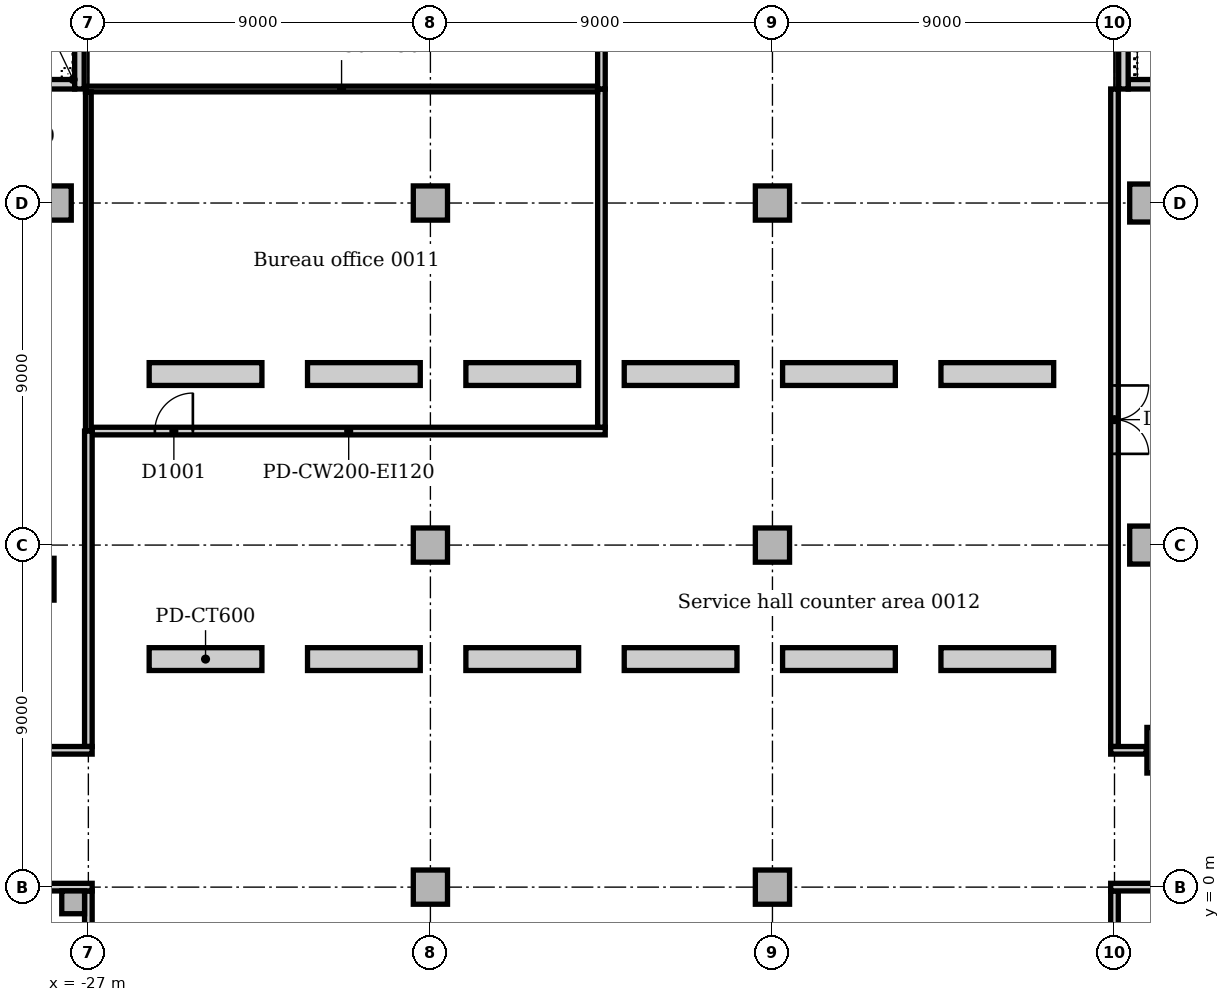
"""IFC4 building model, lengths in metres.
Left out: names, types, materials, properties, quantities, classifications, styles, units other than length and angle.
Written with IfcOpenShell. Run it as: python <this file> out.ifc"""

import sys

from ifc_helpers import new_model, si_unit, direction, frame, frame_2d, origin, origin_2d, place, context, subcontext, project, spatial, rectangle, extrude, element, fill, save


model = new_model("IFC4")
c1 = context("Model", 3, precision=1e-05, world=origin(), true_north=direction((0.0, 1.0)))
c2 = subcontext(c1, "Body", "Model", "MODEL_VIEW")
j1 = project(units=[si_unit("LENGTHUNIT", "METRE"), si_unit("PLANEANGLEUNIT", "RADIAN")], contexts=[c1])
p1 = place(None, origin())
s1 = spatial("IfcSite", under=j1, at=p1, CompositionType="ELEMENT")
p2 = place(p1, origin())
s2 = spatial("IfcBuilding", under=s1, at=p2, CompositionType="ELEMENT")
p3 = place(p2, origin())
s3 = spatial("IfcBuildingStorey", under=s2, at=p3, CompositionType="ELEMENT", Elevation=0.0)
p4 = place(p3, frame((0.36, 21.125, 0.0), z_axis=(0.0, 0.0, 1.0), x_axis=(1.0, 0.0, 0.0)))
e1 = element("IfcWall", 1, at=p4, inside=s3, PredefinedType="SOLIDWALL", context=c2, shape_type="SweptSolid", body=[
    extrude(rectangle(XDim=3.54, YDim=0.25, at=frame_2d((1.77, 0.0))), origin(), (0.0, 0.0, 1.0), 6.0),
])
p5 = place(p3, frame((0.235, 21.0, 0.0), z_axis=(0.0, 0.0, 1.0), x_axis=(0.0, 1.0, 0.0)))
e2 = element("IfcWall", 2, at=p5, inside=s3, PredefinedType="SOLIDWALL", context=c2, shape_type="SweptSolid", body=[
    extrude(rectangle(XDim=21.0, YDim=0.25, at=frame_2d((10.5, 0.0))), origin(), (0.0, 0.0, 1.0), 6.0),
])
p6 = place(p5, frame((10.0, 0.0, 0.0)))
e3 = element("IfcOpeningElement", 3, at=p6, cuts=e2, PredefinedType="OPENING", context=c2, shape_type="SweptSolid", body=[
    extrude(rectangle(XDim=1.0, YDim=2.1, at=frame_2d((0.5, 1.05))), frame((0.0, 0.135, 0.0), z_axis=(0.0, -1.0, 0.0), x_axis=(1.0, 0.0, 0.0)), (0.0, 0.0, 1.0), 0.27),
])
p7 = place(p3, frame((1.453, 3.602, 0.0), z_axis=(0.0, 0.0, 1.0), x_axis=(1.0, 0.0, 0.0)))
e4 = element("IfcColumn", 4, at=p7, inside=s3, PredefinedType="COLUMN", context=c2, shape_type="SweptSolid", body=[
    extrude(rectangle(XDim=1.2, YDim=1.2, at=origin_2d()), origin(), (0.0, 0.0, 1.0), 5.7),
])
for number, where, z_axis, x_axis in (
    (5, (0.9, 9.0, 0.0), (0.0, 0.0, 1.0), (1.0, 0.0, 0.0)),
    (6, (0.9, 18.0, 0.0), (0.0, 0.0, 1.0), (1.0, 0.0, 0.0)),
):
    element("IfcColumn", number, at=place(p3, frame(where, z_axis=z_axis, x_axis=x_axis)), inside=s3, PredefinedType="COLUMN", context=c2, shape_type="SweptSolid", body=[
        extrude(rectangle(XDim=1.0, YDim=1.0, at=origin_2d()), origin(), (0.0, 0.0, 1.0), 5.7),
    ])
p8 = place(p3, frame((-30.9, 21.125, 0.0), z_axis=(0.0, 0.0, 1.0), x_axis=(1.0, 0.0, 0.0)))
e7 = element("IfcWall", 7, at=p8, inside=s3, PredefinedType="SOLIDWALL", context=c2, shape_type="SweptSolid", body=[
    extrude(rectangle(XDim=3.54, YDim=0.25, at=frame_2d((1.77, 0.0))), origin(), (0.0, 0.0, 1.0), 6.0),
])
p9 = place(p3, frame((-27.235, 21.0, 0.0), z_axis=(0.0, 0.0, 1.0), x_axis=(0.0, 1.0, 0.0)))
e8 = element("IfcWall", 8, at=p9, inside=s3, PredefinedType="SOLIDWALL", context=c2, shape_type="SweptSolid", body=[
    extrude(rectangle(XDim=6.65, YDim=0.25, at=frame_2d((3.325, 0.0))), origin(), (0.0, 0.0, 1.0), 6.0),
])
p10 = place(p3, frame((-28.453, 8.102, 0.0), z_axis=(0.0, 0.0, 1.0), x_axis=(1.0, 0.0, 0.0)))
e9 = element("IfcColumn", 9, at=p10, inside=s3, PredefinedType="COLUMN", context=c2, shape_type="SweptSolid", body=[
    extrude(rectangle(XDim=1.1, YDim=1.1, at=origin_2d()), origin(), (0.0, 0.0, 1.0), 5.7),
])
for number, where, z_axis, x_axis in (
    (10, (-27.9, 18.0, 0.0), (0.0, 0.0, 1.0), (1.0, 0.0, 0.0)),
    (11, (-18.0, 0.0, 0.0), (0.0, 0.0, 1.0), (1.0, 0.0, 0.0)),
    (12, (-18.0, 9.0, 0.0), (0.0, 0.0, 1.0), (1.0, 0.0, 0.0)),
    (13, (-18.0, 18.0, 0.0), (0.0, 0.0, 1.0), (1.0, 0.0, 0.0)),
    (14, (-9.0, 0.0, 0.0), (0.0, 0.0, 1.0), (1.0, 0.0, 0.0)),
    (15, (-9.0, 9.0, 0.0), (0.0, 0.0, 1.0), (1.0, 0.0, 0.0)),
    (16, (-9.0, 18.0, 0.0), (0.0, 0.0, 1.0), (1.0, 0.0, 0.0)),
):
    element("IfcColumn", number, at=place(p3, frame(where, z_axis=z_axis, x_axis=x_axis)), inside=s3, PredefinedType="COLUMN", context=c2, shape_type="SweptSolid", body=[
        extrude(rectangle(XDim=0.9, YDim=0.9, at=origin_2d()), origin(), (0.0, 0.0, 1.0), 5.7),
    ])
p11 = place(p3, frame((-27.4, -0.4, 0.0), z_axis=(0.0, 0.0, 1.0), x_axis=(1.0, 0.0, 0.0)))
e17 = element("IfcColumn", 17, at=p11, inside=s3, PredefinedType="COLUMN", context=c2, shape_type="SweptSolid", body=[
    extrude(rectangle(XDim=0.6, YDim=0.6, at=origin_2d()), origin(), (0.0, 0.0, 1.0), 6.0),
])
p12 = place(p3, frame((-27.0, -8.53, 0.0), z_axis=(0.0, 0.0, 1.0), x_axis=(0.0, 1.0, 0.0)))
e18 = element("IfcWall", 18, at=p12, inside=s3, PredefinedType="SOLIDWALL", context=c2, shape_type="SweptSolid", body=[
    extrude(rectangle(XDim=8.43, YDim=0.2, at=frame_2d((4.215, 0.0))), origin(), (0.0, 0.0, 1.0), 5.7),
])
p13 = place(p3, frame((-36.0, 0.0, 0.0), z_axis=(0.0, 0.0, 1.0), x_axis=(1.0, 0.0, 0.0)))
e19 = element("IfcWall", 19, at=p13, inside=s3, PredefinedType="SOLIDWALL", context=c2, shape_type="SweptSolid", body=[
    extrude(rectangle(XDim=9.1, YDim=0.2, at=frame_2d((4.55, 0.0))), origin(), (0.0, 0.0, 1.0), 5.7),
])
p14 = place(p3, frame((0.0, -8.53, 0.0), z_axis=(0.0, 0.0, 1.0), x_axis=(0.0, 1.0, 0.0)))
e20 = element("IfcWall", 20, at=p14, inside=s3, PredefinedType="PARTITIONING", context=c2, shape_type="SweptSolid", body=[
    extrude(rectangle(XDim=8.43, YDim=0.2, at=frame_2d((4.215, 0.0))), origin(), (0.0, 0.0, 1.0), 5.7),
])
p15 = place(p14, frame((2.03, 0.0, 0.0)))
e21 = element("IfcOpeningElement", 21, at=p15, cuts=e20, PredefinedType="OPENING", context=c2, shape_type="SweptSolid", body=[
    extrude(rectangle(XDim=1.0, YDim=2.1, at=frame_2d((0.5, 1.05))), frame((0.0, 0.11, 0.0), z_axis=(0.0, -1.0, 0.0), x_axis=(1.0, 0.0, 0.0)), (0.0, 0.0, 1.0), 0.22),
])
p16 = place(p3, frame((-26.9, 12.0, 0.0), z_axis=(0.0, 0.0, 1.0), x_axis=(1.0, 0.0, 0.0)))
e22 = element("IfcWall", 22, at=p16, inside=s3, PredefinedType="PARTITIONING", context=c2, shape_type="SweptSolid", body=[
    extrude(rectangle(XDim=13.5, YDim=0.2, at=frame_2d((6.75, 0.0))), origin(), (0.0, 0.0, 1.0), 5.7),
])
p17 = place(p16, frame((1.65, 0.0, 0.0)))
e23 = element("IfcOpeningElement", 23, at=p17, cuts=e22, PredefinedType="OPENING", context=c2, shape_type="SweptSolid", body=[
    extrude(rectangle(XDim=1.0, YDim=2.1, at=frame_2d((0.5, 1.05))), frame((0.0, 0.11, 0.0), z_axis=(0.0, -1.0, 0.0), x_axis=(1.0, 0.0, 0.0)), (0.0, 0.0, 1.0), 0.22),
])
p18 = place(p3, frame((-13.5, 12.1, 0.0), z_axis=(0.0, 0.0, 1.0), x_axis=(0.0, 1.0, 0.0)))
e24 = element("IfcWall", 24, at=p18, inside=s3, PredefinedType="PARTITIONING", context=c2, shape_type="SweptSolid", body=[
    extrude(rectangle(XDim=8.9, YDim=0.2, at=frame_2d((4.45, 0.0))), origin(), (0.0, 0.0, 1.0), 5.7),
])
p19 = place(p3, frame((-27.075, 21.0, 0.0), z_axis=(0.0, 0.0, 1.0), x_axis=(1.0, 0.0, 0.0)))
e25 = element("IfcWall", 25, at=p19, inside=s3, PredefinedType="PARTITIONING", context=c2, shape_type="SweptSolid", body=[
    extrude(rectangle(XDim=13.475, YDim=0.15, at=frame_2d((6.737, 0.0))), origin(), (0.0, 0.0, 1.0), 5.7),
])
p20 = place(p3, frame((-27.0, 12.0, 0.0), z_axis=(0.0, 0.0, 1.0), x_axis=(0.0, 1.0, 0.0)))
e26 = element("IfcWall", 26, at=p20, inside=s3, PredefinedType="PARTITIONING", context=c2, shape_type="SweptSolid", body=[
    extrude(rectangle(XDim=8.925, YDim=0.15, at=frame_2d((4.463, 0.0))), origin(), (0.0, 0.0, 1.0), 5.7),
])
p21 = place(p3, frame((-27.0, 3.7, 0.0), z_axis=(0.0, 0.0, 1.0), x_axis=(0.0, 1.0, 0.0)))
e27 = element("IfcWall", 27, at=p21, inside=s3, PredefinedType="PARTITIONING", context=c2, shape_type="SweptSolid", body=[
    extrude(rectangle(XDim=8.3, YDim=0.2, at=frame_2d((4.15, 0.0))), origin(), (0.0, 0.0, 1.0), 5.7),
])
p22 = place(p3, frame((0.0, 3.7, 0.0), z_axis=(0.0, 0.0, 1.0), x_axis=(0.0, 1.0, 0.0)))
e28 = element("IfcWall", 28, at=p22, inside=s3, PredefinedType="PARTITIONING", context=c2, shape_type="SweptSolid", body=[
    extrude(rectangle(XDim=17.3, YDim=0.2, at=frame_2d((8.65, 0.0))), origin(), (0.0, 0.0, 1.0), 5.7),
])
p23 = place(p22, frame((7.7, 0.0, 0.0)))
e29 = element("IfcOpeningElement", 29, at=p23, cuts=e28, PredefinedType="OPENING", context=c2, shape_type="SweptSolid", body=[
    extrude(rectangle(XDim=1.8, YDim=2.1, at=frame_2d((0.9, 1.05))), frame((0.0, 0.11, 0.0), z_axis=(0.0, -1.0, 0.0), x_axis=(1.0, 0.0, 0.0)), (0.0, 0.0, 1.0), 0.22),
])
p24 = place(p3, frame((-13.5, 21.0, 0.0), z_axis=(0.0, 0.0, 1.0), x_axis=(0.0, 1.0, 0.0)))
e30 = element("IfcWall", 30, at=p24, inside=s3, PredefinedType="PARTITIONING", context=c2, shape_type="SweptSolid", body=[
    extrude(rectangle(XDim=10.0, YDim=0.2, at=frame_2d((5.0, 0.0))), origin(), (0.0, 0.0, 1.0), 5.7),
])
p25 = place(p24, frame((5.5, 0.0, 0.0)))
e31 = element("IfcOpeningElement", 31, at=p25, cuts=e30, PredefinedType="OPENING", context=c2, shape_type="SweptSolid", body=[
    extrude(rectangle(XDim=1.0, YDim=2.1, at=frame_2d((0.5, 1.05))), frame((0.0, 0.11, 0.0), z_axis=(0.0, -1.0, 0.0), x_axis=(1.0, 0.0, 0.0)), (0.0, 0.0, 1.0), 0.22),
])
p26 = place(p3, frame((-36.0, 3.6, 0.0), z_axis=(0.0, 0.0, 1.0), x_axis=(1.0, 0.0, 0.0)))
e32 = element("IfcWall", 32, at=p26, inside=s3, PredefinedType="PARTITIONING", context=c2, shape_type="SweptSolid", body=[
    extrude(rectangle(XDim=9.1, YDim=0.2, at=frame_2d((4.55, 0.0))), origin(), (0.0, 0.0, 1.0), 5.7),
])
p27 = place(p26, frame((4.0, 0.0, 0.0)))
e33 = element("IfcOpeningElement", 33, at=p27, cuts=e32, PredefinedType="OPENING", context=c2, shape_type="SweptSolid", body=[
    extrude(rectangle(XDim=1.0, YDim=2.1, at=frame_2d((0.5, 1.05))), frame((0.0, 0.11, 0.0), z_axis=(0.0, -1.0, 0.0), x_axis=(1.0, 0.0, 0.0)), (0.0, 0.0, 1.0), 0.22),
])
p28 = place(p3, frame((-0.1, 0.0, 0.0), z_axis=(0.0, 0.0, 1.0), x_axis=(1.0, 0.0, 0.0)))
e34 = element("IfcWall", 34, at=p28, inside=s3, PredefinedType="PARTITIONING", context=c2, shape_type="SweptSolid", body=[
    extrude(rectangle(XDim=9.1, YDim=0.2, at=frame_2d((4.55, 0.0))), origin(), (0.0, 0.0, 1.0), 5.7),
])
p29 = place(p3, frame((-0.1, 3.6, 0.0), z_axis=(0.0, 0.0, 1.0), x_axis=(1.0, 0.0, 0.0)))
e35 = element("IfcWall", 35, at=p29, inside=s3, PredefinedType="PARTITIONING", context=c2, shape_type="SweptSolid", body=[
    extrude(rectangle(XDim=0.933, YDim=0.2, at=frame_2d((0.467, 0.0))), origin(), (0.0, 0.0, 1.0), 5.7),
])
p30 = place(p3, frame((-25.4, 6.0, 0.0), z_axis=(0.0, 0.0, 1.0), x_axis=(1.0, 0.0, 0.0)))
e36 = element("IfcWall", 36, at=p30, inside=s3, PredefinedType="MOVABLE", context=c2, shape_type="SweptSolid", body=[
    extrude(rectangle(XDim=2.967, YDim=0.6, at=frame_2d((1.483, 0.0))), origin(), (0.0, 0.0, 1.0), 1.1),
])
p31 = place(p3, frame((-21.233, 6.0, 0.0), z_axis=(0.0, 0.0, 1.0), x_axis=(1.0, 0.0, 0.0)))
e37 = element("IfcWall", 37, at=p31, inside=s3, PredefinedType="MOVABLE", context=c2, shape_type="SweptSolid", body=[
    extrude(rectangle(XDim=2.967, YDim=0.6, at=frame_2d((1.483, 0.0))), origin(), (0.0, 0.0, 1.0), 1.1),
])
for number, where, z_axis, x_axis in (
    (38, (-17.067, 6.0, 0.0), (0.0, 0.0, 1.0), (1.0, 0.0, 0.0)),
    (39, (-12.9, 6.0, 0.0), (0.0, 0.0, 1.0), (1.0, 0.0, 0.0)),
):
    element("IfcWall", number, at=place(p3, frame(where, z_axis=z_axis, x_axis=x_axis)), inside=s3, PredefinedType="MOVABLE", context=c2, shape_type="SweptSolid", body=[
        extrude(rectangle(XDim=2.967, YDim=0.6, at=frame_2d((1.483, 0.0))), origin(), (0.0, 0.0, 1.0), 1.1),
    ])
p32 = place(p3, frame((-8.733, 6.0, 0.0), z_axis=(0.0, 0.0, 1.0), x_axis=(1.0, 0.0, 0.0)))
e40 = element("IfcWall", 40, at=p32, inside=s3, PredefinedType="MOVABLE", context=c2, shape_type="SweptSolid", body=[
    extrude(rectangle(XDim=2.967, YDim=0.6, at=frame_2d((1.483, 0.0))), origin(), (0.0, 0.0, 1.0), 1.1),
])
for number, where, z_axis, x_axis in (
    (41, (-4.567, 6.0, 0.0), (0.0, 0.0, 1.0), (1.0, 0.0, 0.0)),
    (42, (-25.4, 13.5, 0.0), (0.0, 0.0, 1.0), (1.0, 0.0, 0.0)),
):
    element("IfcWall", number, at=place(p3, frame(where, z_axis=z_axis, x_axis=x_axis)), inside=s3, PredefinedType="MOVABLE", context=c2, shape_type="SweptSolid", body=[
        extrude(rectangle(XDim=2.967, YDim=0.6, at=frame_2d((1.483, 0.0))), origin(), (0.0, 0.0, 1.0), 1.1),
    ])
p33 = place(p3, frame((-21.233, 13.5, 0.0), z_axis=(0.0, 0.0, 1.0), x_axis=(1.0, 0.0, 0.0)))
e43 = element("IfcWall", 43, at=p33, inside=s3, PredefinedType="MOVABLE", context=c2, shape_type="SweptSolid", body=[
    extrude(rectangle(XDim=2.967, YDim=0.6, at=frame_2d((1.483, 0.0))), origin(), (0.0, 0.0, 1.0), 1.1),
])
for number, where, z_axis, x_axis in (
    (44, (-17.067, 13.5, 0.0), (0.0, 0.0, 1.0), (1.0, 0.0, 0.0)),
    (45, (-12.9, 13.5, 0.0), (0.0, 0.0, 1.0), (1.0, 0.0, 0.0)),
):
    element("IfcWall", number, at=place(p3, frame(where, z_axis=z_axis, x_axis=x_axis)), inside=s3, PredefinedType="MOVABLE", context=c2, shape_type="SweptSolid", body=[
        extrude(rectangle(XDim=2.967, YDim=0.6, at=frame_2d((1.483, 0.0))), origin(), (0.0, 0.0, 1.0), 1.1),
    ])
p34 = place(p3, frame((-8.733, 13.5, 0.0), z_axis=(0.0, 0.0, 1.0), x_axis=(1.0, 0.0, 0.0)))
e46 = element("IfcWall", 46, at=p34, inside=s3, PredefinedType="MOVABLE", context=c2, shape_type="SweptSolid", body=[
    extrude(rectangle(XDim=2.967, YDim=0.6, at=frame_2d((1.483, 0.0))), origin(), (0.0, 0.0, 1.0), 1.1),
])
p35 = place(p3, frame((-4.567, 13.5, 0.0), z_axis=(0.0, 0.0, 1.0), x_axis=(1.0, 0.0, 0.0)))
e47 = element("IfcWall", 47, at=p35, inside=s3, PredefinedType="MOVABLE", context=c2, shape_type="SweptSolid", body=[
    extrude(rectangle(XDim=2.967, YDim=0.6, at=frame_2d((1.483, 0.0))), origin(), (0.0, 0.0, 1.0), 1.1),
])
p36 = place(p3, frame((0.48, 21.25, 0.0), z_axis=(0.0, 0.0, 1.0), x_axis=(0.0, 1.0, 0.0)))
e48 = element("IfcWall", 48, at=p36, inside=s3, PredefinedType="STANDARD", context=c2, shape_type="SweptSolid", body=[
    extrude(rectangle(XDim=1.955, YDim=0.24, at=frame_2d((0.978, 0.0))), origin(), (0.0, 0.0, 1.0), 6.0),
])
p37 = place(p17, origin())
e49 = element("IfcDoor", 49, at=p37, inside=s3, OperationType="SINGLE_SWING_RIGHT", PredefinedType="DOOR", context=c2, shape_type="SweptSolid", body=[
    extrude(rectangle(XDim=1.0, YDim=2.1, at=frame_2d((0.5, 1.05))), frame((0.0, 0.025, 0.0), z_axis=(0.0, -1.0, 0.0), x_axis=(1.0, 0.0, 0.0)), (0.0, 0.0, 1.0), 0.05),
])
fill(e23, e49)
p38 = place(p23, frame((1.8, 0.0, 0.0), z_axis=(0.0, 0.0, 1.0), x_axis=(-1.0, 0.0, 0.0)))
e50 = element("IfcDoor", 50, at=p38, inside=s3, OperationType="DOUBLE_DOOR_SINGLE_SWING", PredefinedType="DOOR", context=c2, shape_type="SweptSolid", body=[
    extrude(rectangle(XDim=1.8, YDim=2.1, at=frame_2d((0.9, 1.05))), frame((0.0, 0.025, 0.0), z_axis=(0.0, -1.0, 0.0), x_axis=(1.0, 0.0, 0.0)), (0.0, 0.0, 1.0), 0.05),
])
fill(e29, e50)
save(model, sys.argv[1])
